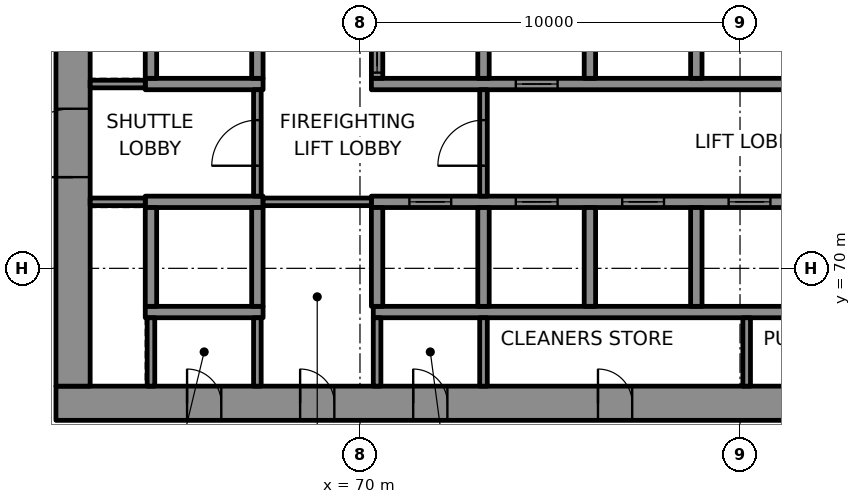
"""IFC4 building model, lengths in metres.
Left out: names, types, materials, properties, quantities, classifications, styles, units other than length and angle.
Written with IfcOpenShell. Run it as: python <this file> out.ifc"""

import sys

from ifc_helpers import new_model, si_unit, direction, frame, frame_2d, origin, place, context, subcontext, project, spatial, rectangle, extrude, element, fill, save


model = new_model("IFC4")
c1 = context("Model", 3, precision=1e-05, world=origin(), true_north=direction((0.0, 1.0)))
c2 = subcontext(c1, "Body", "Model", "MODEL_VIEW")
j1 = project(units=[si_unit("LENGTHUNIT", "METRE"), si_unit("PLANEANGLEUNIT", "RADIAN")], contexts=[c1])
p1 = place(None, origin())
s1 = spatial("IfcSite", under=j1, at=p1, CompositionType="ELEMENT")
p2 = place(p1, origin())
s2 = spatial("IfcBuilding", under=s1, at=p2, CompositionType="ELEMENT")
p3 = place(p2, frame((0.0, 0.0, 8.0)))
s3 = spatial("IfcBuildingStorey", under=s2, at=p3, CompositionType="ELEMENT", Elevation=8.0)
p4 = place(p3, frame((62.0, 66.45, 0.0), z_axis=(0.0, 0.0, 1.0), x_axis=(1.0, 0.0, 0.0)))
e1 = element("IfcWall", 1, at=p4, inside=s3, PredefinedType="SHEAR", context=c2, shape_type="SweptSolid", body=[
    extrude(rectangle(XDim=26.0, YDim=0.9, at=frame_2d((13.0, 0.0))), origin(), (0.0, 0.0, 1.0), 4.3),
])
p5 = place(p4, frame((3.45, 0.0, 0.0)))
e2 = element("IfcOpeningElement", 2, at=p5, cuts=e1, PredefinedType="OPENING", context=c2, shape_type="SweptSolid", body=[
    extrude(rectangle(XDim=0.9, YDim=2.1, at=frame_2d((0.45, 1.05))), frame((0.0, 0.46, 0.0), z_axis=(0.0, -1.0, 0.0), x_axis=(1.0, 0.0, 0.0)), (0.0, 0.0, 1.0), 0.92),
])
p6 = place(p4, frame((6.425, 0.0, 0.0)))
e3 = element("IfcOpeningElement", 3, at=p6, cuts=e1, PredefinedType="OPENING", context=c2, shape_type="SweptSolid", body=[
    extrude(rectangle(XDim=0.9, YDim=2.1, at=frame_2d((0.45, 1.05))), frame((0.0, 0.46, 0.0), z_axis=(0.0, -1.0, 0.0), x_axis=(1.0, 0.0, 0.0)), (0.0, 0.0, 1.0), 0.92),
])
p7 = place(p4, frame((9.4, 0.0, 0.0)))
e4 = element("IfcOpeningElement", 4, at=p7, cuts=e1, PredefinedType="OPENING", context=c2, shape_type="SweptSolid", body=[
    extrude(rectangle(XDim=0.9, YDim=2.1, at=frame_2d((0.45, 1.05))), frame((0.0, 0.46, 0.0), z_axis=(0.0, -1.0, 0.0), x_axis=(1.0, 0.0, 0.0)), (0.0, 0.0, 1.0), 0.92),
])
p8 = place(p4, frame((14.262, 0.0, 0.0)))
e5 = element("IfcOpeningElement", 5, at=p8, cuts=e1, PredefinedType="OPENING", context=c2, shape_type="SweptSolid", body=[
    extrude(rectangle(XDim=0.9, YDim=2.1, at=frame_2d((0.45, 1.05))), frame((0.0, 0.46, 0.0), z_axis=(0.0, -1.0, 0.0), x_axis=(1.0, 0.0, 0.0)), (0.0, 0.0, 1.0), 0.92),
])
p9 = place(p4, frame((21.188, 0.0, 0.0)))
e6 = element("IfcOpeningElement", 6, at=p9, cuts=e1, PredefinedType="OPENING", context=c2, shape_type="SweptSolid", body=[
    extrude(rectangle(XDim=0.9, YDim=2.1, at=frame_2d((0.45, 1.05))), frame((0.0, 0.46, 0.0), z_axis=(0.0, -1.0, 0.0), x_axis=(1.0, 0.0, 0.0)), (0.0, 0.0, 1.0), 0.92),
])
p10 = place(p3, frame((62.45, 66.9, 0.0), z_axis=(0.0, 0.0, 1.0), x_axis=(0.0, 1.0, 0.0)))
e7 = element("IfcWall", 7, at=p10, inside=s3, PredefinedType="SHEAR", context=c2, shape_type="SweptSolid", body=[
    extrude(rectangle(XDim=16.2, YDim=0.9, at=frame_2d((8.1, 0.0))), origin(), (0.0, 0.0, 1.0), 4.3),
])
p11 = place(p10, frame((5.5, 0.0, 0.0)))
e8 = element("IfcOpeningElement", 8, at=p11, cuts=e7, PredefinedType="OPENING", context=c2, shape_type="SweptSolid", body=[
    extrude(rectangle(XDim=1.8, YDim=2.1, at=frame_2d((0.9, 1.05))), frame((0.0, 0.46, 0.0), z_axis=(0.0, -1.0, 0.0), x_axis=(1.0, 0.0, 0.0)), (0.0, 0.0, 1.0), 0.92),
])
p12 = place(p3, frame((64.35, 68.85, 0.0), z_axis=(0.0, 0.0, 1.0), x_axis=(1.0, 0.0, 0.0)))
e9 = element("IfcWall", 9, at=p12, inside=s3, PredefinedType="SHEAR", context=c2, shape_type="SweptSolid", body=[
    extrude(rectangle(XDim=3.1, YDim=0.3, at=frame_2d((1.55, 0.0))), origin(), (0.0, 0.0, 1.0), 4.3),
])
p13 = place(p3, frame((70.35, 68.85, 0.0), z_axis=(0.0, 0.0, 1.0), x_axis=(1.0, 0.0, 0.0)))
e10 = element("IfcWall", 10, at=p13, inside=s3, PredefinedType="SHEAR", context=c2, shape_type="SweptSolid", body=[
    extrude(rectangle(XDim=16.75, YDim=0.3, at=frame_2d((8.375, 0.0))), origin(), (0.0, 0.0, 1.0), 4.3),
])
p14 = place(p3, frame((64.35, 71.75, 0.0), z_axis=(0.0, 0.0, 1.0), x_axis=(1.0, 0.0, 0.0)))
e11 = element("IfcWall", 11, at=p14, inside=s3, PredefinedType="SHEAR", context=c2, shape_type="SweptSolid", body=[
    extrude(rectangle(XDim=3.1, YDim=0.3, at=frame_2d((1.55, 0.0))), origin(), (0.0, 0.0, 1.0), 4.3),
])
p15 = place(p3, frame((70.3, 71.75, 0.0), z_axis=(0.0, 0.0, 1.0), x_axis=(1.0, 0.0, 0.0)))
e12 = element("IfcWall", 12, at=p15, inside=s3, PredefinedType="SHEAR", context=c2, shape_type="SweptSolid", body=[
    extrude(rectangle(XDim=16.8, YDim=0.3, at=frame_2d((8.4, 0.0))), origin(), (0.0, 0.0, 1.0), 4.3),
])
p16 = place(p15, frame((1.0, 0.0, 0.0)))
e13 = element("IfcOpeningElement", 13, at=p16, cuts=e12, PredefinedType="OPENING", context=c2, shape_type="SweptSolid", body=[
    extrude(rectangle(XDim=1.1, YDim=2.1, at=frame_2d((0.55, 1.05))), frame((0.0, 0.16, 0.0), z_axis=(0.0, -1.0, 0.0), x_axis=(1.0, 0.0, 0.0)), (0.0, 0.0, 1.0), 0.32),
])
p17 = place(p15, frame((3.8, 0.0, 0.0)))
e14 = element("IfcOpeningElement", 14, at=p17, cuts=e12, PredefinedType="OPENING", context=c2, shape_type="SweptSolid", body=[
    extrude(rectangle(XDim=1.1, YDim=2.1, at=frame_2d((0.55, 1.05))), frame((0.0, 0.16, 0.0), z_axis=(0.0, -1.0, 0.0), x_axis=(1.0, 0.0, 0.0)), (0.0, 0.0, 1.0), 0.32),
])
p18 = place(p15, frame((6.6, 0.0, 0.0)))
e15 = element("IfcOpeningElement", 15, at=p18, cuts=e12, PredefinedType="OPENING", context=c2, shape_type="SweptSolid", body=[
    extrude(rectangle(XDim=1.1, YDim=2.1, at=frame_2d((0.55, 1.05))), frame((0.0, 0.16, 0.0), z_axis=(0.0, -1.0, 0.0), x_axis=(1.0, 0.0, 0.0)), (0.0, 0.0, 1.0), 0.32),
])
p19 = place(p15, frame((9.4, 0.0, 0.0)))
e16 = element("IfcOpeningElement", 16, at=p19, cuts=e12, PredefinedType="OPENING", context=c2, shape_type="SweptSolid", body=[
    extrude(rectangle(XDim=1.1, YDim=2.1, at=frame_2d((0.55, 1.05))), frame((0.0, 0.16, 0.0), z_axis=(0.0, -1.0, 0.0), x_axis=(1.0, 0.0, 0.0)), (0.0, 0.0, 1.0), 0.32),
])
p20 = place(p15, frame((12.2, 0.0, 0.0)))
e17 = element("IfcOpeningElement", 17, at=p20, cuts=e12, PredefinedType="OPENING", context=c2, shape_type="SweptSolid", body=[
    extrude(rectangle(XDim=1.1, YDim=2.1, at=frame_2d((0.55, 1.05))), frame((0.0, 0.16, 0.0), z_axis=(0.0, -1.0, 0.0), x_axis=(1.0, 0.0, 0.0)), (0.0, 0.0, 1.0), 0.32),
])
p21 = place(p15, frame((14.925, 0.0, 0.0)))
e18 = element("IfcOpeningElement", 18, at=p21, cuts=e12, PredefinedType="OPENING", context=c2, shape_type="SweptSolid", body=[
    extrude(rectangle(XDim=1.1, YDim=2.1, at=frame_2d((0.55, 1.05))), frame((0.0, 0.16, 0.0), z_axis=(0.0, -1.0, 0.0), x_axis=(1.0, 0.0, 0.0)), (0.0, 0.0, 1.0), 0.32),
])
p22 = place(p3, frame((64.35, 74.85, 0.0), z_axis=(0.0, 0.0, 1.0), x_axis=(1.0, 0.0, 0.0)))
e19 = element("IfcWall", 19, at=p22, inside=s3, PredefinedType="SHEAR", context=c2, shape_type="SweptSolid", body=[
    extrude(rectangle(XDim=3.1, YDim=0.3, at=frame_2d((1.55, 0.0))), origin(), (0.0, 0.0, 1.0), 4.3),
])
p23 = place(p3, frame((70.3, 74.85, 0.0), z_axis=(0.0, 0.0, 1.0), x_axis=(1.0, 0.0, 0.0)))
e20 = element("IfcWall", 20, at=p23, inside=s3, PredefinedType="SHEAR", context=c2, shape_type="SweptSolid", body=[
    extrude(rectangle(XDim=16.8, YDim=0.3, at=frame_2d((8.4, 0.0))), origin(), (0.0, 0.0, 1.0), 4.3),
])
p24 = place(p23, frame((3.8, 0.0, 0.0)))
e21 = element("IfcOpeningElement", 21, at=p24, cuts=e20, PredefinedType="OPENING", context=c2, shape_type="SweptSolid", body=[
    extrude(rectangle(XDim=1.1, YDim=2.1, at=frame_2d((0.55, 1.05))), frame((0.0, 0.16, 0.0), z_axis=(0.0, -1.0, 0.0), x_axis=(1.0, 0.0, 0.0)), (0.0, 0.0, 1.0), 0.32),
])
p25 = place(p23, frame((12.2, 0.0, 0.0)))
e22 = element("IfcOpeningElement", 22, at=p25, cuts=e20, PredefinedType="OPENING", context=c2, shape_type="SweptSolid", body=[
    extrude(rectangle(XDim=1.1, YDim=2.1, at=frame_2d((0.55, 1.05))), frame((0.0, 0.16, 0.0), z_axis=(0.0, -1.0, 0.0), x_axis=(1.0, 0.0, 0.0)), (0.0, 0.0, 1.0), 0.32),
])
p26 = place(p23, frame((14.925, 0.0, 0.0)))
e23 = element("IfcOpeningElement", 23, at=p26, cuts=e20, PredefinedType="OPENING", context=c2, shape_type="SweptSolid", body=[
    extrude(rectangle(XDim=1.1, YDim=2.1, at=frame_2d((0.55, 1.05))), frame((0.0, 0.16, 0.0), z_axis=(0.0, -1.0, 0.0), x_axis=(1.0, 0.0, 0.0)), (0.0, 0.0, 1.0), 0.32),
])
for number, where, z_axis, x_axis in (
    (24, (64.5, 69.0, 0.0), (0.0, 0.0, 1.0), (0.0, 1.0, 0.0)),
    (25, (64.5, 75.0, 0.0), (0.0, 0.0, 1.0), (0.0, 1.0, 0.0)),
    (26, (67.3, 69.0, 0.0), (0.0, 0.0, 1.0), (0.0, 1.0, 0.0)),
    (27, (67.3, 75.0, 0.0), (0.0, 0.0, 1.0), (0.0, 1.0, 0.0)),
    (28, (70.45, 69.0, 0.0), (0.0, 0.0, 1.0), (0.0, 1.0, 0.0)),
):
    element("IfcWall", number, at=place(p3, frame(where, z_axis=z_axis, x_axis=x_axis)), inside=s3, PredefinedType="SHEAR", context=c2, shape_type="SweptSolid", body=[
        extrude(rectangle(XDim=2.6, YDim=0.3, at=frame_2d((1.3, 0.0))), origin(), (0.0, 0.0, 1.0), 4.3),
    ])
p27 = place(p3, frame((70.45, 75.0, 0.0), z_axis=(0.0, 0.0, 1.0), x_axis=(0.0, 1.0, 0.0)))
e29 = element("IfcWall", 29, at=p27, inside=s3, PredefinedType="SHEAR", context=c2, shape_type="SweptSolid", body=[
    extrude(rectangle(XDim=2.6, YDim=0.3, at=frame_2d((1.3, 0.0))), origin(), (0.0, 0.0, 1.0), 4.3),
])
p28 = place(p27, frame((0.15, 0.0, 0.0)))
e30 = element("IfcOpeningElement", 30, at=p28, cuts=e29, PredefinedType="OPENING", context=c2, shape_type="SweptSolid", body=[
    extrude(rectangle(XDim=1.1, YDim=2.1, at=frame_2d((0.55, 1.05))), frame((0.0, 0.16, 0.0), z_axis=(0.0, -1.0, 0.0), x_axis=(1.0, 0.0, 0.0)), (0.0, 0.0, 1.0), 0.32),
])
for number, where, z_axis, x_axis in (
    (31, (73.25, 69.0, 0.0), (0.0, 0.0, 1.0), (0.0, 1.0, 0.0)),
    (32, (73.25, 75.0, 0.0), (0.0, 0.0, 1.0), (0.0, 1.0, 0.0)),
    (33, (76.05, 69.0, 0.0), (0.0, 0.0, 1.0), (0.0, 1.0, 0.0)),
    (34, (76.05, 75.0, 0.0), (0.0, 0.0, 1.0), (0.0, 1.0, 0.0)),
    (35, (78.85, 69.0, 0.0), (0.0, 0.0, 1.0), (0.0, 1.0, 0.0)),
    (36, (78.85, 75.0, 0.0), (0.0, 0.0, 1.0), (0.0, 1.0, 0.0)),
):
    element("IfcWall", number, at=place(p3, frame(where, z_axis=z_axis, x_axis=x_axis)), inside=s3, PredefinedType="SHEAR", context=c2, shape_type="SweptSolid", body=[
        extrude(rectangle(XDim=2.6, YDim=0.3, at=frame_2d((1.3, 0.0))), origin(), (0.0, 0.0, 1.0), 4.3),
    ])
p29 = place(p3, frame((62.9, 71.75, 0.0), z_axis=(0.0, 0.0, 1.0), x_axis=(1.0, 0.0, 0.0)))
e37 = element("IfcWall", 37, at=p29, inside=s3, PredefinedType="PARTITIONING", context=c2, shape_type="SweptSolid", body=[
    extrude(rectangle(XDim=1.45, YDim=0.2, at=frame_2d((0.725, 0.0))), origin(), (0.0, 0.0, 1.0), 4.3),
])
p30 = place(p3, frame((67.45, 71.75, 0.0), z_axis=(0.0, 0.0, 1.0), x_axis=(1.0, 0.0, 0.0)))
e38 = element("IfcWall", 38, at=p30, inside=s3, PredefinedType="PARTITIONING", context=c2, shape_type="SweptSolid", body=[
    extrude(rectangle(XDim=2.85, YDim=0.2, at=frame_2d((1.425, 0.0))), origin(), (0.0, 0.0, 1.0), 4.3),
])
p31 = place(p3, frame((62.9, 74.85, 0.0), z_axis=(0.0, 0.0, 1.0), x_axis=(1.0, 0.0, 0.0)))
e39 = element("IfcWall", 39, at=p31, inside=s3, PredefinedType="PARTITIONING", context=c2, shape_type="SweptSolid", body=[
    extrude(rectangle(XDim=1.45, YDim=0.2, at=frame_2d((0.725, 0.0))), origin(), (0.0, 0.0, 1.0), 4.3),
])
for number, where, z_axis, x_axis in (
    (40, (64.5, 66.9, 0.0), (0.0, 0.0, 1.0), (0.0, 1.0, 0.0)),
    (41, (67.3, 66.9, 0.0), (0.0, 0.0, 1.0), (0.0, 1.0, 0.0)),
):
    element("IfcWall", number, at=place(p3, frame(where, z_axis=z_axis, x_axis=x_axis)), inside=s3, PredefinedType="PARTITIONING", context=c2, shape_type="SweptSolid", body=[
        extrude(rectangle(XDim=1.8, YDim=0.2, at=frame_2d((0.9, 0.0))), origin(), (0.0, 0.0, 1.0), 4.3),
    ])
p32 = place(p3, frame((67.3, 71.9, 0.0), z_axis=(0.0, 0.0, 1.0), x_axis=(0.0, 1.0, 0.0)))
e42 = element("IfcWall", 42, at=p32, inside=s3, PredefinedType="PARTITIONING", context=c2, shape_type="SweptSolid", body=[
    extrude(rectangle(XDim=2.8, YDim=0.2, at=frame_2d((1.4, 0.0))), origin(), (0.0, 0.0, 1.0), 4.3),
])
p33 = place(p32, frame((0.8, 0.0, 0.0)))
e43 = element("IfcOpeningElement", 43, at=p33, cuts=e42, PredefinedType="OPENING", context=c2, shape_type="SweptSolid", body=[
    extrude(rectangle(XDim=1.2, YDim=2.1, at=frame_2d((0.6, 1.05))), frame((0.0, 0.11, 0.0), z_axis=(0.0, -1.0, 0.0), x_axis=(1.0, 0.0, 0.0)), (0.0, 0.0, 1.0), 0.22),
])
for number, where, z_axis, x_axis in (
    (44, (70.45, 66.9, 0.0), (0.0, 0.0, 1.0), (0.0, 1.0, 0.0)),
    (45, (73.25, 66.9, 0.0), (0.0, 0.0, 1.0), (0.0, 1.0, 0.0)),
):
    element("IfcWall", number, at=place(p3, frame(where, z_axis=z_axis, x_axis=x_axis)), inside=s3, PredefinedType="PARTITIONING", context=c2, shape_type="SweptSolid", body=[
        extrude(rectangle(XDim=1.8, YDim=0.2, at=frame_2d((0.9, 0.0))), origin(), (0.0, 0.0, 1.0), 4.3),
    ])
p34 = place(p3, frame((73.25, 71.9, 0.0), z_axis=(0.0, 0.0, 1.0), x_axis=(0.0, 1.0, 0.0)))
e46 = element("IfcWall", 46, at=p34, inside=s3, PredefinedType="PARTITIONING", context=c2, shape_type="SweptSolid", body=[
    extrude(rectangle(XDim=2.8, YDim=0.2, at=frame_2d((1.4, 0.0))), origin(), (0.0, 0.0, 1.0), 4.3),
])
p35 = place(p34, frame((0.8, 0.0, 0.0)))
e47 = element("IfcOpeningElement", 47, at=p35, cuts=e46, PredefinedType="OPENING", context=c2, shape_type="SweptSolid", body=[
    extrude(rectangle(XDim=1.2, YDim=2.1, at=frame_2d((0.6, 1.05))), frame((0.0, 0.11, 0.0), z_axis=(0.0, -1.0, 0.0), x_axis=(1.0, 0.0, 0.0)), (0.0, 0.0, 1.0), 0.22),
])
p36 = place(p3, frame((80.175, 66.9, 0.0), z_axis=(0.0, 0.0, 1.0), x_axis=(0.0, 1.0, 0.0)))
e48 = element("IfcWall", 48, at=p36, inside=s3, PredefinedType="PARTITIONING", context=c2, shape_type="SweptSolid", body=[
    extrude(rectangle(XDim=1.8, YDim=0.2, at=frame_2d((0.9, 0.0))), origin(), (0.0, 0.0, 1.0), 4.3),
])
p37 = place(p3, frame((107.106, 62.36, 0.0), z_axis=(0.0, 0.0, 1.0), x_axis=(-0.49999992739, 0.866025445706, 0.0)))
e49 = element("IfcWall", 49, at=p37, inside=s3, PredefinedType="SOLIDWALL", context=c2, shape_type="SweptSolid", body=[
    extrude(rectangle(XDim=54.0, YDim=0.4, at=frame_2d((27.0, 0.0))), origin(), (0.0, 0.0, 1.0), 4.24),
])
p38 = place(p16, origin())
e50 = element("IfcDoor", 50, at=p38, inside=s3, OperationType="DOUBLE_DOOR_SLIDING", PredefinedType="DOOR", context=c2, shape_type="SweptSolid", body=[
    extrude(rectangle(XDim=1.1, YDim=2.1, at=frame_2d((0.55, 1.05))), frame((0.0, 0.025, 0.0), z_axis=(0.0, -1.0, 0.0), x_axis=(1.0, 0.0, 0.0)), (0.0, 0.0, 1.0), 0.05),
])
fill(e13, e50)
p39 = place(p17, origin())
e51 = element("IfcDoor", 51, at=p39, inside=s3, OperationType="DOUBLE_DOOR_SLIDING", PredefinedType="DOOR", context=c2, shape_type="SweptSolid", body=[
    extrude(rectangle(XDim=1.1, YDim=2.1, at=frame_2d((0.55, 1.05))), frame((0.0, 0.025, 0.0), z_axis=(0.0, -1.0, 0.0), x_axis=(1.0, 0.0, 0.0)), (0.0, 0.0, 1.0), 0.05),
])
fill(e14, e51)
p40 = place(p18, origin())
e52 = element("IfcDoor", 52, at=p40, inside=s3, OperationType="DOUBLE_DOOR_SLIDING", PredefinedType="DOOR", context=c2, shape_type="SweptSolid", body=[
    extrude(rectangle(XDim=1.1, YDim=2.1, at=frame_2d((0.55, 1.05))), frame((0.0, 0.025, 0.0), z_axis=(0.0, -1.0, 0.0), x_axis=(1.0, 0.0, 0.0)), (0.0, 0.0, 1.0), 0.05),
])
fill(e15, e52)
p41 = place(p19, origin())
e53 = element("IfcDoor", 53, at=p41, inside=s3, OperationType="DOUBLE_DOOR_SLIDING", PredefinedType="DOOR", context=c2, shape_type="SweptSolid", body=[
    extrude(rectangle(XDim=1.1, YDim=2.1, at=frame_2d((0.55, 1.05))), frame((0.0, 0.025, 0.0), z_axis=(0.0, -1.0, 0.0), x_axis=(1.0, 0.0, 0.0)), (0.0, 0.0, 1.0), 0.05),
])
fill(e16, e53)
p42 = place(p28, origin())
e54 = element("IfcDoor", 54, at=p42, inside=s3, OperationType="DOUBLE_DOOR_SLIDING", PredefinedType="DOOR", context=c2, shape_type="SweptSolid", body=[
    extrude(rectangle(XDim=1.1, YDim=2.1, at=frame_2d((0.55, 1.05))), frame((0.0, 0.025, 0.0), z_axis=(0.0, -1.0, 0.0), x_axis=(1.0, 0.0, 0.0)), (0.0, 0.0, 1.0), 0.05),
])
fill(e30, e54)
p43 = place(p24, origin())
e55 = element("IfcDoor", 55, at=p43, inside=s3, OperationType="DOUBLE_DOOR_SLIDING", PredefinedType="DOOR", context=c2, shape_type="SweptSolid", body=[
    extrude(rectangle(XDim=1.1, YDim=2.1, at=frame_2d((0.55, 1.05))), frame((0.0, 0.025, 0.0), z_axis=(0.0, -1.0, 0.0), x_axis=(1.0, 0.0, 0.0)), (0.0, 0.0, 1.0), 0.05),
])
fill(e21, e55)
p44 = place(p35, origin())
e56 = element("IfcDoor", 56, at=p44, inside=s3, OperationType="SINGLE_SWING_LEFT", PredefinedType="DOOR", context=c2, shape_type="SweptSolid", body=[
    extrude(rectangle(XDim=1.2, YDim=2.1, at=frame_2d((0.6, 1.05))), frame((0.0, 0.025, 0.0), z_axis=(0.0, -1.0, 0.0), x_axis=(1.0, 0.0, 0.0)), (0.0, 0.0, 1.0), 0.05),
])
fill(e47, e56)
p45 = place(p33, origin())
e57 = element("IfcDoor", 57, at=p45, inside=s3, OperationType="SINGLE_SWING_RIGHT", PredefinedType="DOOR", context=c2, shape_type="SweptSolid", body=[
    extrude(rectangle(XDim=1.2, YDim=2.1, at=frame_2d((0.6, 1.05))), frame((0.0, 0.025, 0.0), z_axis=(0.0, -1.0, 0.0), x_axis=(1.0, 0.0, 0.0)), (0.0, 0.0, 1.0), 0.05),
])
fill(e43, e57)
p46 = place(p11, origin())
e58 = element("IfcDoor", 58, at=p46, inside=s3, OperationType="SINGLE_SWING_LEFT", PredefinedType="DOOR", context=c2, shape_type="SweptSolid", body=[
    extrude(rectangle(XDim=1.8, YDim=2.1, at=frame_2d((0.9, 1.05))), frame((0.0, 0.17, 0.0), z_axis=(0.0, -1.0, 0.0), x_axis=(1.0, 0.0, 0.0)), (0.0, 0.0, 1.0), 0.34),
])
fill(e8, e58)
p47 = place(p5, origin())
e59 = element("IfcDoor", 59, at=p47, inside=s3, OperationType="SINGLE_SWING_LEFT", PredefinedType="DOOR", context=c2, shape_type="SweptSolid", body=[
    extrude(rectangle(XDim=0.9, YDim=2.1, at=frame_2d((0.45, 1.05))), frame((0.0, 0.17, 0.0), z_axis=(0.0, -1.0, 0.0), x_axis=(1.0, 0.0, 0.0)), (0.0, 0.0, 1.0), 0.34),
])
fill(e2, e59)
p48 = place(p6, origin())
e60 = element("IfcDoor", 60, at=p48, inside=s3, OperationType="SINGLE_SWING_RIGHT", PredefinedType="DOOR", context=c2, shape_type="SweptSolid", body=[
    extrude(rectangle(XDim=0.9, YDim=2.1, at=frame_2d((0.45, 1.05))), frame((0.0, 0.17, 0.0), z_axis=(0.0, -1.0, 0.0), x_axis=(1.0, 0.0, 0.0)), (0.0, 0.0, 1.0), 0.34),
])
fill(e3, e60)
p49 = place(p7, origin())
e61 = element("IfcDoor", 61, at=p49, inside=s3, OperationType="SINGLE_SWING_LEFT", PredefinedType="DOOR", context=c2, shape_type="SweptSolid", body=[
    extrude(rectangle(XDim=0.9, YDim=2.1, at=frame_2d((0.45, 1.05))), frame((0.0, 0.17, 0.0), z_axis=(0.0, -1.0, 0.0), x_axis=(1.0, 0.0, 0.0)), (0.0, 0.0, 1.0), 0.34),
])
fill(e4, e61)
p50 = place(p8, origin())
e62 = element("IfcDoor", 62, at=p50, inside=s3, OperationType="SINGLE_SWING_RIGHT", PredefinedType="DOOR", context=c2, shape_type="SweptSolid", body=[
    extrude(rectangle(XDim=0.9, YDim=2.1, at=frame_2d((0.45, 1.05))), frame((0.0, 0.17, 0.0), z_axis=(0.0, -1.0, 0.0), x_axis=(1.0, 0.0, 0.0)), (0.0, 0.0, 1.0), 0.34),
])
fill(e5, e62)
save(model, sys.argv[1])
